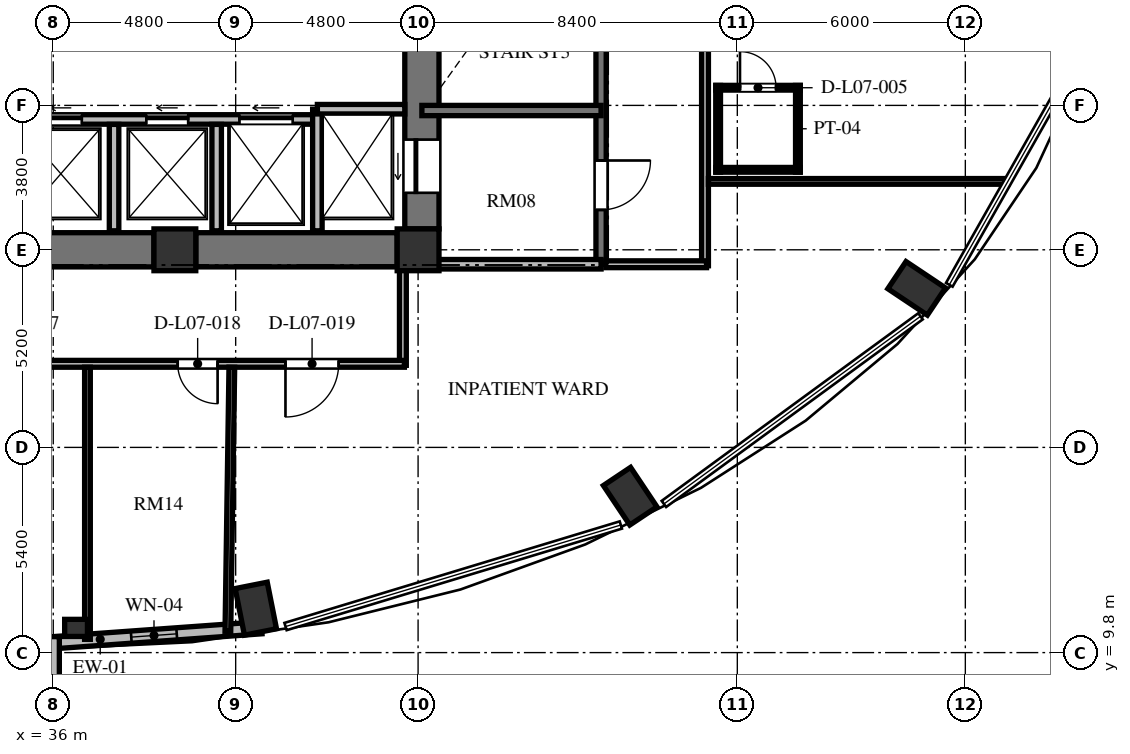
"""IFC4 building model, lengths in metres.
Left out: names, types, materials, properties, quantities, classifications, styles, units other than length and angle.
Written with IfcOpenShell. Run it as: python <this file> out.ifc"""

import sys

from ifc_helpers import new_model, si_unit, direction, frame, frame_2d, origin, origin_2d, place, context, subcontext, project, spatial, rectangle, extrude, element, fill, save


model = new_model("IFC4")
c1 = context("Model", 3, precision=1e-05, world=origin(), true_north=direction((0.0, 1.0)))
c2 = subcontext(c1, "Body", "Model", "MODEL_VIEW")
j1 = project(units=[si_unit("LENGTHUNIT", "METRE"), si_unit("PLANEANGLEUNIT", "RADIAN")], contexts=[c1])
p1 = place(None, origin())
s1 = spatial("IfcSite", under=j1, at=p1, CompositionType="ELEMENT")
p2 = place(p1, origin())
s2 = spatial("IfcBuilding", under=s1, at=p2, CompositionType="ELEMENT")
p3 = place(p2, frame((0.0, 0.0, 32.496)))
s3 = spatial("IfcBuildingStorey", under=s2, at=p3, CompositionType="ELEMENT", Elevation=32.496)
for number, where, z_axis, x_axis in (
    (1, (41.331, 10.956, 0.0), (0.0, 0.0, 1.0), (0.195, -0.981, 0.0)),
    (2, (51.181, 13.916, 0.0), (0.0, 0.0, 1.0), (0.556, -0.831, 0.0)),
    (3, (58.72, 19.386, 0.0), (0.0, 0.0, 1.0), (0.831, -0.556, 0.0)),
):
    element("IfcColumn", number, at=place(p3, frame(where, z_axis=z_axis, x_axis=x_axis)), inside=s3, PredefinedType="COLUMN", context=c2, shape_type="SweptSolid", body=[
        extrude(rectangle(XDim=1.25, YDim=0.86, at=origin_2d()), origin(), (0.0, 0.0, 1.0), 3.648),
    ])
for number, where, z_axis, x_axis in (
    (4, (39.2, 20.4, 0.0), (0.0, 0.0, 1.0), (1.0, 0.0, 0.0)),
    (5, (45.6, 20.4, 0.0), (0.0, 0.0, 1.0), (1.0, 0.0, 0.0)),
):
    element("IfcColumn", number, at=place(p3, frame(where, z_axis=z_axis, x_axis=x_axis)), inside=s3, PredefinedType="COLUMN", context=c2, shape_type="SweptSolid", body=[
        extrude(rectangle(XDim=1.1, YDim=1.1, at=origin_2d()), origin(), (0.0, 0.0, 1.0), 3.648),
    ])
p4 = place(p3, frame((36.6, 10.45, 0.0), z_axis=(0.0, 0.0, 1.0), x_axis=(1.0, 0.0, 0.0)))
e6 = element("IfcColumn", 6, at=p4, inside=s3, PredefinedType="PILASTER", context=c2, shape_type="SweptSolid", body=[
    extrude(rectangle(XDim=0.6, YDim=0.45, at=origin_2d()), origin(), (0.0, 0.0, 1.0), 3.648),
])
p5 = place(p3, frame((45.7, 20.95, 0.0), z_axis=(0.0, 0.0, 1.0), x_axis=(0.0, 1.0, 0.0)))
e7 = element("IfcWall", 7, at=p5, inside=s3, PredefinedType="SHEAR", context=c2, shape_type="SweptSolid", body=[
    extrude(rectangle(XDim=14.1, YDim=0.9, at=frame_2d((7.05, 0.0))), origin(), (0.0, 0.0, 1.0), 3.648),
])
p6 = place(p5, frame((11.75, 0.0, 0.0)))
e8 = element("IfcOpeningElement", 8, at=p6, cuts=e7, PredefinedType="OPENING", context=c2, shape_type="SweptSolid", body=[
    extrude(rectangle(XDim=1.4, YDim=2.3, at=frame_2d((0.7, 1.15))), frame((0.0, 0.46, 0.0), z_axis=(0.0, -1.0, 0.0), x_axis=(1.0, 0.0, 0.0)), (0.0, 0.0, 1.0), 0.92),
])
p7 = place(p5, frame((0.95, 0.0, 0.0)))
e9 = element("IfcOpeningElement", 9, at=p7, cuts=e7, PredefinedType="OPENING", context=c2, shape_type="SweptSolid", body=[
    extrude(rectangle(XDim=1.4, YDim=2.3, at=frame_2d((0.7, 1.15))), frame((0.0, 0.46, 0.0), z_axis=(0.0, -1.0, 0.0), x_axis=(1.0, 0.0, 0.0)), (0.0, 0.0, 1.0), 0.92),
])
p8 = place(p3, frame((33.35, 20.4, 0.0), z_axis=(0.0, 0.0, 1.0), x_axis=(1.0, 0.0, 0.0)))
e10 = element("IfcWall", 10, at=p8, inside=s3, PredefinedType="SHEAR", context=c2, shape_type="SweptSolid", body=[
    extrude(rectangle(XDim=5.3, YDim=0.9, at=frame_2d((2.65, 0.0))), origin(), (0.0, 0.0, 1.0), 3.648),
])
p9 = place(p3, frame((39.75, 20.4, 0.0), z_axis=(0.0, 0.0, 1.0), x_axis=(1.0, 0.0, 0.0)))
e11 = element("IfcWall", 11, at=p9, inside=s3, PredefinedType="SHEAR", context=c2, shape_type="SweptSolid", body=[
    extrude(rectangle(XDim=5.3, YDim=0.9, at=frame_2d((2.65, 0.0))), origin(), (0.0, 0.0, 1.0), 3.648),
])
p10 = place(p3, frame((35.821, 10.047, 0.0), z_axis=(0.0, 0.0, 1.0), x_axis=(0.997422321809, 0.071754525696, 0.0)))
e12 = element("IfcWall", 12, at=p10, inside=s3, PredefinedType="SOLIDWALL", context=c2, shape_type="SweptSolid", body=[
    extrude(rectangle(XDim=5.675, YDim=0.32, at=frame_2d((2.838, 0.0))), origin(), (0.0, 0.0, 1.0), 3.428),
])
p11 = place(p10, frame((2.238, 0.0, 0.85)))
e13 = element("IfcOpeningElement", 13, at=p11, cuts=e12, PredefinedType="OPENING", context=c2, shape_type="SweptSolid", body=[
    extrude(rectangle(XDim=1.2, YDim=1.8, at=frame_2d((0.6, 0.9))), frame((0.0, 0.17, 0.0), z_axis=(0.0, -1.0, 0.0), x_axis=(1.0, 0.0, 0.0)), (0.0, 0.0, 1.0), 0.34),
])
p12 = place(p3, frame((36.0, 5.1, 0.0), z_axis=(0.0, 0.0, 1.0), x_axis=(0.0, 1.0, 0.0)))
e14 = element("IfcWall", 14, at=p12, inside=s3, PredefinedType="SOLIDWALL", context=c2, shape_type="SweptSolid", body=[
    extrude(rectangle(XDim=5.12, YDim=0.32, at=frame_2d((2.56, 0.0))), origin(), (0.0, 0.0, 1.0), 3.428),
])
p13 = place(p12, frame((1.36, 0.0, 0.84)))
e15 = element("IfcOpeningElement", 15, at=p13, cuts=e14, PredefinedType="OPENING", context=c2, shape_type="SweptSolid", body=[
    extrude(rectangle(XDim=2.4, YDim=2.04, at=frame_2d((1.2, 1.02))), frame((0.0, 0.17, 0.0), z_axis=(0.0, -1.0, 0.0), x_axis=(1.0, 0.0, 0.0)), (0.0, 0.0, 1.0), 0.34),
])
p14 = place(p3, frame((26.75, 23.83, 0.0), z_axis=(0.0, 0.0, 1.0), x_axis=(1.0, 0.0, 0.0)))
e16 = element("IfcWall", 16, at=p14, inside=s3, PredefinedType="SOLIDWALL", context=c2, shape_type="SweptSolid", body=[
    extrude(rectangle(XDim=16.2, YDim=0.25, at=frame_2d((8.1, 0.0))), origin(), (0.0, 0.0, 1.0), 3.428),
])
p15 = place(p14, frame((0.9, 0.0, 0.0)))
e17 = element("IfcOpeningElement", 17, at=p15, cuts=e16, PredefinedType="OPENING", context=c2, shape_type="SweptSolid", body=[
    extrude(rectangle(XDim=1.1, YDim=2.2, at=frame_2d((0.55, 1.1))), frame((0.0, 0.135, 0.0), z_axis=(0.0, -1.0, 0.0), x_axis=(1.0, 0.0, 0.0)), (0.0, 0.0, 1.0), 0.27),
])
p16 = place(p14, frame((3.5, 0.0, 0.0)))
e18 = element("IfcOpeningElement", 18, at=p16, cuts=e16, PredefinedType="OPENING", context=c2, shape_type="SweptSolid", body=[
    extrude(rectangle(XDim=1.1, YDim=2.2, at=frame_2d((0.55, 1.1))), frame((0.0, 0.135, 0.0), z_axis=(0.0, -1.0, 0.0), x_axis=(1.0, 0.0, 0.0)), (0.0, 0.0, 1.0), 0.27),
])
p17 = place(p14, frame((6.3, 0.0, 0.0)))
e19 = element("IfcOpeningElement", 19, at=p17, cuts=e16, PredefinedType="OPENING", context=c2, shape_type="SweptSolid", body=[
    extrude(rectangle(XDim=1.1, YDim=2.2, at=frame_2d((0.55, 1.1))), frame((0.0, 0.135, 0.0), z_axis=(0.0, -1.0, 0.0), x_axis=(1.0, 0.0, 0.0)), (0.0, 0.0, 1.0), 0.27),
])
p18 = place(p14, frame((8.9, 0.0, 0.0)))
e20 = element("IfcOpeningElement", 20, at=p18, cuts=e16, PredefinedType="OPENING", context=c2, shape_type="SweptSolid", body=[
    extrude(rectangle(XDim=1.1, YDim=2.2, at=frame_2d((0.55, 1.1))), frame((0.0, 0.135, 0.0), z_axis=(0.0, -1.0, 0.0), x_axis=(1.0, 0.0, 0.0)), (0.0, 0.0, 1.0), 0.27),
])
p19 = place(p14, frame((11.7, 0.0, 0.0)))
e21 = element("IfcOpeningElement", 21, at=p19, cuts=e16, PredefinedType="OPENING", context=c2, shape_type="SweptSolid", body=[
    extrude(rectangle(XDim=1.1, YDim=2.2, at=frame_2d((0.55, 1.1))), frame((0.0, 0.135, 0.0), z_axis=(0.0, -1.0, 0.0), x_axis=(1.0, 0.0, 0.0)), (0.0, 0.0, 1.0), 0.27),
])
p20 = place(p14, frame((14.15, 0.0, 0.0)))
e22 = element("IfcOpeningElement", 22, at=p20, cuts=e16, PredefinedType="OPENING", context=c2, shape_type="SweptSolid", body=[
    extrude(rectangle(XDim=1.4, YDim=2.3, at=frame_2d((0.7, 1.15))), frame((0.0, 0.135, 0.0), z_axis=(0.0, -1.0, 0.0), x_axis=(1.0, 0.0, 0.0)), (0.0, 0.0, 1.0), 0.27),
])
p21 = place(p3, frame((42.95, 20.9, 0.0), z_axis=(0.0, 0.0, 1.0), x_axis=(0.0, 1.0, 0.0)))
e23 = element("IfcWall", 23, at=p21, inside=s3, PredefinedType="SOLIDWALL", context=c2, shape_type="SweptSolid", body=[
    extrude(rectangle(XDim=3.2, YDim=0.25, at=frame_2d((1.6, 0.0))), origin(), (0.0, 0.0, 1.0), 3.428),
])
p22 = place(p3, frame((42.95, 24.1, 0.0), z_axis=(0.0, 0.0, 1.0), x_axis=(1.0, 0.0, 0.0)))
e24 = element("IfcWall", 24, at=p22, inside=s3, PredefinedType="SOLIDWALL", context=c2, shape_type="SweptSolid", body=[
    extrude(rectangle(XDim=2.3, YDim=0.25, at=frame_2d((1.15, 0.0))), origin(), (0.0, 0.0, 1.0), 3.428),
])
for number, where, z_axis, x_axis in (
    (25, (37.6, 20.9, 0.0), (0.0, 0.0, 1.0), (0.0, 1.0, 0.0)),
    (26, (40.3, 20.9, 0.0), (0.0, 0.0, 1.0), (0.0, 1.0, 0.0)),
):
    element("IfcWall", number, at=place(p3, frame(where, z_axis=z_axis, x_axis=x_axis)), inside=s3, PredefinedType="SOLIDWALL", context=c2, shape_type="SweptSolid", body=[
        extrude(rectangle(XDim=2.8, YDim=0.25, at=frame_2d((1.4, 0.0))), origin(), (0.0, 0.0, 1.0), 3.428),
    ])
p23 = place(p3, frame((50.415, 35.845, 0.0), z_axis=(0.0, 0.0, 1.0), x_axis=(0.0, -1.0, 0.0)))
e27 = element("IfcWall", 27, at=p23, inside=s3, PredefinedType="SHEAR", context=c2, shape_type="SweptSolid", body=[
    extrude(rectangle(XDim=15.825, YDim=0.27, at=frame_2d((7.913, 0.0))), origin(), (0.0, 0.0, 1.0), 3.648),
])
p24 = place(p23, frame((4.445, 0.0, 0.0)))
e28 = element("IfcOpeningElement", 28, at=p24, cuts=e27, PredefinedType="OPENING", context=c2, shape_type="SweptSolid", body=[
    extrude(rectangle(XDim=1.2, YDim=2.15, at=frame_2d((0.6, 1.075))), frame((0.0, 0.145, 0.0), z_axis=(0.0, -1.0, 0.0), x_axis=(1.0, 0.0, 0.0)), (0.0, 0.0, 1.0), 0.29),
])
p25 = place(p23, frame((1.295, 0.0, 0.0)))
e29 = element("IfcOpeningElement", 29, at=p25, cuts=e27, PredefinedType="OPENING", context=c2, shape_type="SweptSolid", body=[
    extrude(rectangle(XDim=1.3, YDim=2.2, at=frame_2d((0.65, 1.1))), frame((0.0, 0.145, 0.0), z_axis=(0.0, -1.0, 0.0), x_axis=(1.0, 0.0, 0.0)), (0.0, 0.0, 1.0), 0.29),
])
p26 = place(p23, frame((13.095, 0.0, 0.0)))
e30 = element("IfcOpeningElement", 30, at=p26, cuts=e27, PredefinedType="OPENING", context=c2, shape_type="SweptSolid", body=[
    extrude(rectangle(XDim=1.3, YDim=2.2, at=frame_2d((0.65, 1.1))), frame((0.0, 0.145, 0.0), z_axis=(0.0, -1.0, 0.0), x_axis=(1.0, 0.0, 0.0)), (0.0, 0.0, 1.0), 0.29),
])
p27 = place(p3, frame((45.7, 24.065, 0.0), z_axis=(0.0, 0.0, 1.0), x_axis=(1.0, 0.0, 0.0)))
e31 = element("IfcWall", 31, at=p27, inside=s3, PredefinedType="SHEAR", context=c2, shape_type="SweptSolid", body=[
    extrude(rectangle(XDim=4.715, YDim=0.27, at=frame_2d((2.357, 0.0))), origin(), (0.0, 0.0, 1.0), 3.648),
])
p28 = place(p3, frame((45.7, 20.02, 0.0), z_axis=(0.0, 0.0, 1.0), x_axis=(1.0, 0.0, 0.0)))
e32 = element("IfcWall", 32, at=p28, inside=s3, PredefinedType="SOLIDWALL", context=c2, shape_type="SweptSolid", body=[
    extrude(rectangle(XDim=4.715, YDim=0.25, at=frame_2d((2.357, 0.0))), origin(), (0.0, 0.0, 1.0), 2.813),
])
p29 = place(p3, frame((53.15, 26.64, 0.0), z_axis=(0.0, 0.0, 1.0), x_axis=(0.0, -1.0, 0.0)))
e33 = element("IfcWall", 33, at=p29, inside=s3, PredefinedType="PARTITIONING", context=c2, shape_type="SweptSolid", body=[
    extrude(rectangle(XDim=6.66, YDim=0.18, at=frame_2d((3.33, 0.0))), origin(), (0.0, 0.0, 1.0), 3.428),
])
p30 = place(p3, frame((53.19, 20.02, 0.0), z_axis=(0.0, 0.0, 1.0), x_axis=(-1.0, 0.0, 0.0)))
e34 = element("IfcWall", 34, at=p30, inside=s3, PredefinedType="PARTITIONING", context=c2, shape_type="SweptSolid", body=[
    extrude(rectangle(XDim=2.65, YDim=0.18, at=frame_2d((1.325, 0.0))), origin(), (0.0, 0.0, 1.0), 2.813),
])
p31 = place(p3, frame((45.2, 19.91, 0.0), z_axis=(0.0, 0.0, 1.0), x_axis=(0.0, -1.0, 0.0)))
e35 = element("IfcWall", 35, at=p31, inside=s3, PredefinedType="PARTITIONING", context=c2, shape_type="SweptSolid", body=[
    extrude(rectangle(XDim=2.55, YDim=0.18, at=frame_2d((1.275, 0.0))), origin(), (0.0, 0.0, 1.0), 3.428),
])
p32 = place(p3, frame((45.24, 17.4, 0.0), z_axis=(0.0, 0.0, 1.0), x_axis=(-1.0, 0.0, 0.0)))
e36 = element("IfcWall", 36, at=p32, inside=s3, PredefinedType="PARTITIONING", context=c2, shape_type="SweptSolid", body=[
    extrude(rectangle(XDim=21.93, YDim=0.18, at=frame_2d((10.965, 0.0))), origin(), (0.0, 0.0, 1.0), 3.053),
])
p33 = place(p32, frame((18.076, 0.0, 0.0)))
e37 = element("IfcOpeningElement", 37, at=p33, cuts=e36, PredefinedType="OPENING", context=c2, shape_type="SweptSolid", body=[
    extrude(rectangle(XDim=1.4, YDim=2.2, at=frame_2d((0.7, 1.1))), frame((0.0, 0.1, 0.0), z_axis=(0.0, -1.0, 0.0), x_axis=(1.0, 0.0, 0.0)), (0.0, 0.0, 1.0), 0.2),
])
p34 = place(p32, frame((13.34, 0.0, 0.0)))
e38 = element("IfcOpeningElement", 38, at=p34, cuts=e36, PredefinedType="OPENING", context=c2, shape_type="SweptSolid", body=[
    extrude(rectangle(XDim=1.4, YDim=2.2, at=frame_2d((0.7, 1.1))), frame((0.0, 0.1, 0.0), z_axis=(0.0, -1.0, 0.0), x_axis=(1.0, 0.0, 0.0)), (0.0, 0.0, 1.0), 0.2),
])
p35 = place(p32, frame((9.715, 0.0, 0.0)))
e39 = element("IfcOpeningElement", 39, at=p35, cuts=e36, PredefinedType="OPENING", context=c2, shape_type="SweptSolid", body=[
    extrude(rectangle(XDim=1.05, YDim=2.15, at=frame_2d((0.525, 1.075))), frame((0.0, 0.1, 0.0), z_axis=(0.0, -1.0, 0.0), x_axis=(1.0, 0.0, 0.0)), (0.0, 0.0, 1.0), 0.2),
])
p36 = place(p32, frame((4.916, 0.0, 0.0)))
e40 = element("IfcOpeningElement", 40, at=p36, cuts=e36, PredefinedType="OPENING", context=c2, shape_type="SweptSolid", body=[
    extrude(rectangle(XDim=1.05, YDim=2.15, at=frame_2d((0.525, 1.075))), frame((0.0, 0.1, 0.0), z_axis=(0.0, -1.0, 0.0), x_axis=(1.0, 0.0, 0.0)), (0.0, 0.0, 1.0), 0.2),
])
p37 = place(p32, frame((1.729, 0.0, 0.0)))
e41 = element("IfcOpeningElement", 41, at=p37, cuts=e36, PredefinedType="OPENING", context=c2, shape_type="SweptSolid", body=[
    extrude(rectangle(XDim=1.4, YDim=2.2, at=frame_2d((0.7, 1.1))), frame((0.0, 0.1, 0.0), z_axis=(0.0, -1.0, 0.0), x_axis=(1.0, 0.0, 0.0)), (0.0, 0.0, 1.0), 0.2),
])
p38 = place(p3, frame((53.24, 22.2, 0.0), z_axis=(0.0, 0.0, 1.0), x_axis=(1.0, 0.0, 0.0)))
e42 = element("IfcWall", 42, at=p38, inside=s3, PredefinedType="PARTITIONING", context=c2, shape_type="SweptSolid", body=[
    extrude(rectangle(XDim=7.875, YDim=0.15, at=frame_2d((3.938, 0.0))), origin(), (0.0, 0.0, 1.0), 3.428),
])
p39 = place(p3, frame((36.9, 10.15, 0.0), z_axis=(0.0, 0.0, 1.0), x_axis=(0.0, 1.0, 0.0)))
e43 = element("IfcWall", 43, at=p39, inside=s3, PredefinedType="PARTITIONING", context=c2, shape_type="SweptSolid", body=[
    extrude(rectangle(XDim=7.16, YDim=0.15, at=frame_2d((3.58, 0.0))), origin(), (0.0, 0.0, 1.0), 3.428),
])
p40 = place(p3, frame((40.595, 10.359, 0.0), z_axis=(0.0, 0.0, 1.0), x_axis=(0.014960393547, 0.99988808705, 0.0)))
e44 = element("IfcWall", 44, at=p40, inside=s3, PredefinedType="PARTITIONING", context=c2, shape_type="SweptSolid", body=[
    extrude(rectangle(XDim=6.952, YDim=0.15, at=frame_2d((3.476, 0.0))), origin(), (0.0, 0.0, 1.0), 2.813),
])
p41 = place(p3, frame((53.435, 24.665, 0.0), z_axis=(0.0, 0.0, 1.0), x_axis=(1.0, 0.0, 0.0)))
e45 = element("IfcWall", 45, at=p41, inside=s3, PredefinedType="PARTITIONING", context=c2, shape_type="SweptSolid", body=[
    extrude(rectangle(XDim=2.22, YDim=0.125, at=frame_2d((1.11, 0.0))), origin(), (0.0, 0.0, 1.0), 3.428),
])
p42 = place(p41, frame((0.635, 0.0, 0.0)))
e46 = element("IfcOpeningElement", 46, at=p42, cuts=e45, PredefinedType="OPENING", context=c2, shape_type="SweptSolid", body=[
    extrude(rectangle(XDim=0.95, YDim=2.1, at=frame_2d((0.475, 1.05))), frame((0.0, 0.073, 0.0), z_axis=(0.0, -1.0, 0.0), x_axis=(1.0, 0.0, 0.0)), (0.0, 0.0, 1.0), 0.145),
])
p43 = place(p3, frame((53.435, 22.505, 0.0), z_axis=(0.0, 0.0, 1.0), x_axis=(1.0, 0.0, 0.0)))
e47 = element("IfcWall", 47, at=p43, inside=s3, PredefinedType="PARTITIONING", context=c2, shape_type="SweptSolid", body=[
    extrude(rectangle(XDim=2.22, YDim=0.125, at=frame_2d((1.11, 0.0))), origin(), (0.0, 0.0, 1.0), 3.428),
])
for number, where, z_axis, x_axis in (
    (48, (55.595, 22.445, 0.0), (0.0, 0.0, 1.0), (0.0, 1.0, 0.0)),
    (49, (53.495, 22.445, 0.0), (0.0, 0.0, 1.0), (0.0, 1.0, 0.0)),
):
    element("IfcWall", number, at=place(p3, frame(where, z_axis=z_axis, x_axis=x_axis)), inside=s3, PredefinedType="PARTITIONING", context=c2, shape_type="SweptSolid", body=[
        extrude(rectangle(XDim=2.28, YDim=0.125, at=frame_2d((1.14, 0.0))), origin(), (0.0, 0.0, 1.0), 3.428),
    ])
p44 = place(p11, origin())
e50 = element("IfcWindow", 50, at=p44, inside=s3, PartitioningType="SINGLE_PANEL", PredefinedType="WINDOW", context=c2, shape_type="SweptSolid", body=[
    extrude(rectangle(XDim=1.2, YDim=1.8, at=frame_2d((0.6, 0.9))), frame((0.0, 0.03, 0.0), z_axis=(0.0, -1.0, 0.0), x_axis=(1.0, 0.0, 0.0)), (0.0, 0.0, 1.0), 0.06),
])
fill(e13, e50)
p45 = place(p18, origin())
e51 = element("IfcDoor", 51, at=p45, inside=s3, OperationType="SLIDING_TO_LEFT", PredefinedType="DOOR", context=c2, shape_type="SweptSolid", body=[
    extrude(rectangle(XDim=1.1, YDim=2.2, at=frame_2d((0.55, 1.1))), frame((0.0, 0.025, 0.0), z_axis=(0.0, -1.0, 0.0), x_axis=(1.0, 0.0, 0.0)), (0.0, 0.0, 1.0), 0.05),
])
fill(e20, e51)
p46 = place(p19, origin())
e52 = element("IfcDoor", 52, at=p46, inside=s3, OperationType="SLIDING_TO_LEFT", PredefinedType="DOOR", context=c2, shape_type="SweptSolid", body=[
    extrude(rectangle(XDim=1.1, YDim=2.2, at=frame_2d((0.55, 1.1))), frame((0.0, 0.025, 0.0), z_axis=(0.0, -1.0, 0.0), x_axis=(1.0, 0.0, 0.0)), (0.0, 0.0, 1.0), 0.05),
])
fill(e21, e52)
p47 = place(p7, origin())
e53 = element("IfcDoor", 53, at=p47, inside=s3, OperationType="SLIDING_TO_LEFT", PredefinedType="DOOR", context=c2, shape_type="SweptSolid", body=[
    extrude(rectangle(XDim=1.4, YDim=2.3, at=frame_2d((0.7, 1.15))), frame((0.0, 0.025, 0.0), z_axis=(0.0, -1.0, 0.0), x_axis=(1.0, 0.0, 0.0)), (0.0, 0.0, 1.0), 0.05),
])
fill(e9, e53)
p48 = place(p20, origin())
e54 = element("IfcDoor", 54, at=p48, inside=s3, OperationType="SLIDING_TO_LEFT", PredefinedType="DOOR", context=c2, shape_type="SweptSolid", body=[
    extrude(rectangle(XDim=1.4, YDim=2.3, at=frame_2d((0.7, 1.15))), frame((0.0, 0.025, 0.0), z_axis=(0.0, -1.0, 0.0), x_axis=(1.0, 0.0, 0.0)), (0.0, 0.0, 1.0), 0.05),
])
fill(e22, e54)
p49 = place(p26, origin())
e55 = element("IfcDoor", 55, at=p49, inside=s3, OperationType="SINGLE_SWING_LEFT", PredefinedType="DOOR", context=c2, shape_type="SweptSolid", body=[
    extrude(rectangle(XDim=1.3, YDim=2.2, at=frame_2d((0.65, 1.1))), frame((0.0, 0.025, 0.0), z_axis=(0.0, -1.0, 0.0), x_axis=(1.0, 0.0, 0.0)), (0.0, 0.0, 1.0), 0.05),
])
fill(e30, e55)
p50 = place(p36, origin())
e56 = element("IfcDoor", 56, at=p50, inside=s3, OperationType="SINGLE_SWING_LEFT", PredefinedType="DOOR", context=c2, shape_type="SweptSolid", body=[
    extrude(rectangle(XDim=1.05, YDim=2.15, at=frame_2d((0.525, 1.075))), frame((0.0, 0.025, 0.0), z_axis=(0.0, -1.0, 0.0), x_axis=(1.0, 0.0, 0.0)), (0.0, 0.0, 1.0), 0.05),
])
fill(e40, e56)
p51 = place(p37, origin())
e57 = element("IfcDoor", 57, at=p51, inside=s3, OperationType="SINGLE_SWING_RIGHT", PredefinedType="DOOR", context=c2, shape_type="SweptSolid", body=[
    extrude(rectangle(XDim=1.4, YDim=2.2, at=frame_2d((0.7, 1.1))), frame((0.0, 0.025, 0.0), z_axis=(0.0, -1.0, 0.0), x_axis=(1.0, 0.0, 0.0)), (0.0, 0.0, 1.0), 0.05),
])
fill(e41, e57)
p52 = place(p42, origin())
e58 = element("IfcDoor", 58, at=p52, inside=s3, OperationType="SINGLE_SWING_LEFT", PredefinedType="DOOR", context=c2, shape_type="SweptSolid", body=[
    extrude(rectangle(XDim=0.95, YDim=2.1, at=frame_2d((0.475, 1.05))), frame((0.0, 0.025, 0.0), z_axis=(0.0, -1.0, 0.0), x_axis=(1.0, 0.0, 0.0)), (0.0, 0.0, 1.0), 0.05),
])
fill(e46, e58)
save(model, sys.argv[1])
